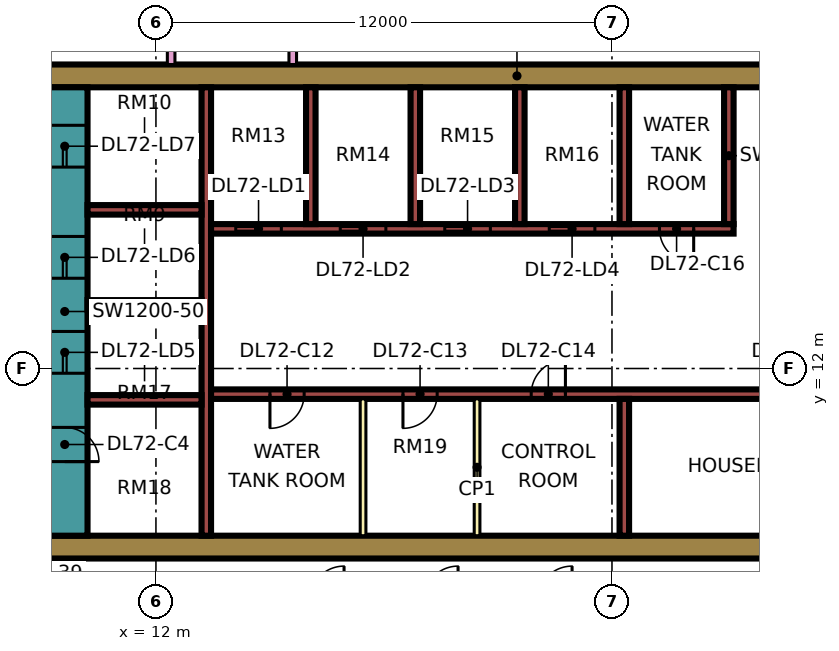
"""IFC4 building model, lengths in metres.
Left out: names, types, materials, properties, quantities, classifications, styles, units other than length and angle.
Written with IfcOpenShell. Run it as: python <this file> out.ifc"""

import sys

from ifc_helpers import new_model, si_unit, direction, frame, frame_2d, origin, place, context, subcontext, project, spatial, rectangle, extrude, element, fill, save


model = new_model("IFC4")
c1 = context("Model", 3, precision=1e-05, world=origin(), true_north=direction((0.0, 1.0)))
c2 = subcontext(c1, "Body", "Model", "MODEL_VIEW")
j1 = project(units=[si_unit("LENGTHUNIT", "METRE"), si_unit("PLANEANGLEUNIT", "RADIAN")], contexts=[c1])
p1 = place(None, origin())
s1 = spatial("IfcSite", under=j1, at=p1, CompositionType="ELEMENT")
p2 = place(p1, origin())
s2 = spatial("IfcBuilding", under=s1, at=p2, CompositionType="ELEMENT")
p3 = place(p2, frame((0.0, 0.0, 307.15)))
s3 = spatial("IfcBuildingStorey", under=s2, at=p3, CompositionType="ELEMENT", Elevation=307.15)
p4 = place(p3, frame((9.0, 7.3, 0.0), z_axis=(0.0, 0.0, 1.0), x_axis=(1.0, 0.0, 0.0)))
e1 = element("IfcWall", 1, at=p4, inside=s3, PredefinedType="SHEAR", context=c2, shape_type="SweptSolid", body=[
    extrude(rectangle(XDim=25.0, YDim=0.6, at=frame_2d((12.5, 0.0))), origin(), (0.0, 0.0, 1.0), 3.75),
])
p5 = place(p3, frame((9.0, 19.7, 0.0), z_axis=(0.0, 0.0, 1.0), x_axis=(1.0, 0.0, 0.0)))
e2 = element("IfcWall", 2, at=p5, inside=s3, PredefinedType="SHEAR", context=c2, shape_type="SweptSolid", body=[
    extrude(rectangle(XDim=25.0, YDim=0.6, at=frame_2d((12.5, 0.0))), origin(), (0.0, 0.0, 1.0), 3.75),
])
p6 = place(p5, frame((19.1, 0.0, 0.0)))
e3 = element("IfcOpeningElement", 3, at=p6, cuts=e2, PredefinedType="OPENING", context=c2, shape_type="SweptSolid", body=[
    extrude(rectangle(XDim=1.8, YDim=2.4, at=frame_2d((0.9, 1.2))), frame((0.0, 0.31, 0.0), z_axis=(0.0, -1.0, 0.0), x_axis=(1.0, 0.0, 0.0)), (0.0, 0.0, 1.0), 0.62),
])
p7 = place(p3, frame((9.6, 7.6, 0.0), z_axis=(0.0, 0.0, 1.0), x_axis=(0.0, 1.0, 0.0)))
e4 = element("IfcWall", 4, at=p7, inside=s3, PredefinedType="SHEAR", context=c2, shape_type="SweptSolid", body=[
    extrude(rectangle(XDim=11.8, YDim=1.2, at=frame_2d((5.9, 0.0))), origin(), (0.0, 0.0, 1.0), 3.75),
])
p8 = place(p7, frame((4.275, 0.0, 0.0)))
e5 = element("IfcOpeningElement", 5, at=p8, cuts=e4, PredefinedType="OPENING", context=c2, shape_type="SweptSolid", body=[
    extrude(rectangle(XDim=1.1, YDim=2.2, at=frame_2d((0.55, 1.1))), frame((0.0, 0.61, 0.0), z_axis=(0.0, -1.0, 0.0), x_axis=(1.0, 0.0, 0.0)), (0.0, 0.0, 1.0), 1.22),
])
p9 = place(p7, frame((6.775, 0.0, 0.0)))
e6 = element("IfcOpeningElement", 6, at=p9, cuts=e4, PredefinedType="OPENING", context=c2, shape_type="SweptSolid", body=[
    extrude(rectangle(XDim=1.1, YDim=2.2, at=frame_2d((0.55, 1.1))), frame((0.0, 0.61, 0.0), z_axis=(0.0, -1.0, 0.0), x_axis=(1.0, 0.0, 0.0)), (0.0, 0.0, 1.0), 1.22),
])
p10 = place(p7, frame((9.7, 0.0, 0.0)))
e7 = element("IfcOpeningElement", 7, at=p10, cuts=e4, PredefinedType="OPENING", context=c2, shape_type="SweptSolid", body=[
    extrude(rectangle(XDim=1.1, YDim=2.2, at=frame_2d((0.55, 1.1))), frame((0.0, 0.61, 0.0), z_axis=(0.0, -1.0, 0.0), x_axis=(1.0, 0.0, 0.0)), (0.0, 0.0, 1.0), 1.22),
])
p11 = place(p7, frame((1.95, 0.0, 0.0)))
e8 = element("IfcOpeningElement", 8, at=p11, cuts=e4, PredefinedType="OPENING", context=c2, shape_type="SweptSolid", body=[
    extrude(rectangle(XDim=0.9, YDim=2.1, at=frame_2d((0.45, 1.05))), frame((0.0, 0.61, 0.0), z_axis=(0.0, -1.0, 0.0), x_axis=(1.0, 0.0, 0.0)), (0.0, 0.0, 1.0), 1.22),
])
p12 = place(p3, frame((13.325, 7.6, 0.0), z_axis=(0.0, 0.0, 1.0), x_axis=(0.0, 1.0, 0.0)))
e9 = element("IfcWall", 9, at=p12, inside=s3, PredefinedType="SHEAR", context=c2, shape_type="SweptSolid", body=[
    extrude(rectangle(XDim=11.8, YDim=0.25, at=frame_2d((5.9, 0.0))), origin(), (0.0, 0.0, 1.0), 3.75),
])
p13 = place(p3, frame((13.45, 11.325, 0.0), z_axis=(0.0, 0.0, 1.0), x_axis=(1.0, 0.0, 0.0)))
e10 = element("IfcWall", 10, at=p13, inside=s3, PredefinedType="SHEAR", context=c2, shape_type="SweptSolid", body=[
    extrude(rectangle(XDim=19.95, YDim=0.25, at=frame_2d((9.975, 0.0))), origin(), (0.0, 0.0, 1.0), 3.75),
])
p14 = place(p13, frame((1.55, 0.0, 0.0)))
e11 = element("IfcOpeningElement", 11, at=p14, cuts=e10, PredefinedType="OPENING", context=c2, shape_type="SweptSolid", body=[
    extrude(rectangle(XDim=0.9, YDim=2.1, at=frame_2d((0.45, 1.05))), frame((0.0, 0.135, 0.0), z_axis=(0.0, -1.0, 0.0), x_axis=(1.0, 0.0, 0.0)), (0.0, 0.0, 1.0), 0.27),
])
p15 = place(p13, frame((5.05, 0.0, 0.0)))
e12 = element("IfcOpeningElement", 12, at=p15, cuts=e10, PredefinedType="OPENING", context=c2, shape_type="SweptSolid", body=[
    extrude(rectangle(XDim=0.9, YDim=2.1, at=frame_2d((0.45, 1.05))), frame((0.0, 0.135, 0.0), z_axis=(0.0, -1.0, 0.0), x_axis=(1.0, 0.0, 0.0)), (0.0, 0.0, 1.0), 0.27),
])
p16 = place(p13, frame((8.425, 0.0, 0.0)))
e13 = element("IfcOpeningElement", 13, at=p16, cuts=e10, PredefinedType="OPENING", context=c2, shape_type="SweptSolid", body=[
    extrude(rectangle(XDim=0.9, YDim=2.1, at=frame_2d((0.45, 1.05))), frame((0.0, 0.135, 0.0), z_axis=(0.0, -1.0, 0.0), x_axis=(1.0, 0.0, 0.0)), (0.0, 0.0, 1.0), 0.27),
])
p17 = place(p13, frame((15.025, 0.0, 0.0)))
e14 = element("IfcOpeningElement", 14, at=p17, cuts=e10, PredefinedType="OPENING", context=c2, shape_type="SweptSolid", body=[
    extrude(rectangle(XDim=0.9, YDim=2.1, at=frame_2d((0.45, 1.05))), frame((0.0, 0.135, 0.0), z_axis=(0.0, -1.0, 0.0), x_axis=(1.0, 0.0, 0.0)), (0.0, 0.0, 1.0), 0.27),
])
p18 = place(p3, frame((13.45, 15.675, 0.0), z_axis=(0.0, 0.0, 1.0), x_axis=(1.0, 0.0, 0.0)))
e15 = element("IfcWall", 15, at=p18, inside=s3, PredefinedType="SHEAR", context=c2, shape_type="SweptSolid", body=[
    extrude(rectangle(XDim=13.75, YDim=0.25, at=frame_2d((6.875, 0.0))), origin(), (0.0, 0.0, 1.0), 3.75),
])
p19 = place(p18, frame((0.65, 0.0, 0.0)))
e16 = element("IfcOpeningElement", 16, at=p19, cuts=e15, PredefinedType="OPENING", context=c2, shape_type="SweptSolid", body=[
    extrude(rectangle(XDim=1.2, YDim=2.2, at=frame_2d((0.6, 1.1))), frame((0.0, 0.135, 0.0), z_axis=(0.0, -1.0, 0.0), x_axis=(1.0, 0.0, 0.0)), (0.0, 0.0, 1.0), 0.27),
])
p20 = place(p18, frame((3.4, 0.0, 0.0)))
e17 = element("IfcOpeningElement", 17, at=p20, cuts=e15, PredefinedType="OPENING", context=c2, shape_type="SweptSolid", body=[
    extrude(rectangle(XDim=1.2, YDim=2.2, at=frame_2d((0.6, 1.1))), frame((0.0, 0.135, 0.0), z_axis=(0.0, -1.0, 0.0), x_axis=(1.0, 0.0, 0.0)), (0.0, 0.0, 1.0), 0.27),
])
p21 = place(p18, frame((6.15, 0.0, 0.0)))
e18 = element("IfcOpeningElement", 18, at=p21, cuts=e15, PredefinedType="OPENING", context=c2, shape_type="SweptSolid", body=[
    extrude(rectangle(XDim=1.2, YDim=2.2, at=frame_2d((0.6, 1.1))), frame((0.0, 0.135, 0.0), z_axis=(0.0, -1.0, 0.0), x_axis=(1.0, 0.0, 0.0)), (0.0, 0.0, 1.0), 0.27),
])
p22 = place(p18, frame((8.9, 0.0, 0.0)))
e19 = element("IfcOpeningElement", 19, at=p22, cuts=e15, PredefinedType="OPENING", context=c2, shape_type="SweptSolid", body=[
    extrude(rectangle(XDim=1.2, YDim=2.2, at=frame_2d((0.6, 1.1))), frame((0.0, 0.135, 0.0), z_axis=(0.0, -1.0, 0.0), x_axis=(1.0, 0.0, 0.0)), (0.0, 0.0, 1.0), 0.27),
])
p23 = place(p18, frame((11.8, 0.0, 0.0)))
e20 = element("IfcOpeningElement", 20, at=p23, cuts=e15, PredefinedType="OPENING", context=c2, shape_type="SweptSolid", body=[
    extrude(rectangle(XDim=0.9, YDim=2.1, at=frame_2d((0.45, 1.05))), frame((0.0, 0.135, 0.0), z_axis=(0.0, -1.0, 0.0), x_axis=(1.0, 0.0, 0.0)), (0.0, 0.0, 1.0), 0.27),
])
for number, where, z_axis, x_axis in (
    (21, (10.2, 11.175, 0.0), (0.0, 0.0, 1.0), (1.0, 0.0, 0.0)),
    (22, (10.2, 13.675, 0.0), (0.0, 0.0, 1.0), (1.0, 0.0, 0.0)),
    (23, (10.2, 16.175, 0.0), (0.0, 0.0, 1.0), (1.0, 0.0, 0.0)),
):
    element("IfcWall", number, at=place(p3, frame(where, z_axis=z_axis, x_axis=x_axis)), inside=s3, PredefinedType="SHEAR", context=c2, shape_type="SweptSolid", body=[
        extrude(rectangle(XDim=3.0, YDim=0.25, at=frame_2d((1.5, 0.0))), origin(), (0.0, 0.0, 1.0), 3.75),
    ])
for number, where, z_axis, x_axis in (
    (24, (24.325, 7.6, 0.0), (0.0, 0.0, 1.0), (0.0, 1.0, 0.0)),
    (25, (16.075, 15.8, 0.0), (0.0, 0.0, 1.0), (0.0, 1.0, 0.0)),
    (26, (18.825, 15.8, 0.0), (0.0, 0.0, 1.0), (0.0, 1.0, 0.0)),
    (27, (21.575, 15.8, 0.0), (0.0, 0.0, 1.0), (0.0, 1.0, 0.0)),
    (28, (24.325, 15.8, 0.0), (0.0, 0.0, 1.0), (0.0, 1.0, 0.0)),
    (29, (27.075, 15.8, 0.0), (0.0, 0.0, 1.0), (0.0, 1.0, 0.0)),
):
    element("IfcWall", number, at=place(p3, frame(where, z_axis=z_axis, x_axis=x_axis)), inside=s3, PredefinedType="SHEAR", context=c2, shape_type="SweptSolid", body=[
        extrude(rectangle(XDim=3.6, YDim=0.25, at=frame_2d((1.8, 0.0))), origin(), (0.0, 0.0, 1.0), 3.75),
    ])
p24 = place(p3, frame((-1.447, 12.553, 0.0), z_axis=(0.0, 0.0, 1.0), x_axis=(0.707106781187, -0.707106781187, 0.0)))
e30 = element("IfcWall", 30, at=p24, inside=s3, PredefinedType="SOLIDWALL", context=c2, shape_type="SweptSolid", body=[
    extrude(rectangle(XDim=19.799, YDim=0.15, at=frame_2d((9.899, 0.0))), origin(), (0.0, 0.0, 1.0), 3.35),
])
p25 = place(p24, frame((2.212, 0.0, 0.45)))
e31 = element("IfcOpeningElement", 31, at=p25, cuts=e30, PredefinedType="OPENING", context=c2, shape_type="SweptSolid", body=[
    extrude(rectangle(XDim=3.0, YDim=2.4, at=frame_2d((1.5, 1.2))), frame((0.0, 0.085, 0.0), z_axis=(0.0, -1.0, 0.0), x_axis=(1.0, 0.0, 0.0)), (0.0, 0.0, 1.0), 0.17),
])
p26 = place(p24, frame((10.216, 0.0, 0.45)))
e32 = element("IfcOpeningElement", 32, at=p26, cuts=e30, PredefinedType="OPENING", context=c2, shape_type="SweptSolid", body=[
    extrude(rectangle(XDim=3.0, YDim=2.4, at=frame_2d((1.5, 1.2))), frame((0.0, 0.085, 0.0), z_axis=(0.0, -1.0, 0.0), x_axis=(1.0, 0.0, 0.0)), (0.0, 0.0, 1.0), 0.17),
])
for number, where, z_axis, x_axis in (
    (33, (17.45, 7.6, 0.0), (0.0, 0.0, 1.0), (0.0, 1.0, 0.0)),
    (34, (20.45, 7.6, 0.0), (0.0, 0.0, 1.0), (0.0, 1.0, 0.0)),
):
    element("IfcWall", number, at=place(p3, frame(where, z_axis=z_axis, x_axis=x_axis)), inside=s3, PredefinedType="PARTITIONING", context=c2, shape_type="SweptSolid", body=[
        extrude(rectangle(XDim=3.6, YDim=0.15, at=frame_2d((1.8, 0.0))), origin(), (0.0, 0.0, 1.0), 3.35),
    ])
p27 = place(p3, frame((12.4, 20.0, 0.0), z_axis=(0.0, 0.0, 1.0), x_axis=(0.0, 1.0, 0.0)))
e35 = element("IfcWall", 35, at=p27, inside=s3, PredefinedType="PARTITIONING", context=c2, shape_type="SweptSolid", body=[
    extrude(rectangle(XDim=34.0, YDim=0.2, at=frame_2d((17.0, 0.0))), origin(), (0.0, 0.0, 1.0), 3.35),
])
p28 = place(p27, frame((19.8, 0.0, 0.0)))
e36 = element("IfcOpeningElement", 36, at=p28, cuts=e35, PredefinedType="OPENING", context=c2, shape_type="SweptSolid", body=[
    extrude(rectangle(XDim=1.0, YDim=2.1, at=frame_2d((0.5, 1.05))), frame((0.0, 0.11, 0.0), z_axis=(0.0, -1.0, 0.0), x_axis=(1.0, 0.0, 0.0)), (0.0, 0.0, 1.0), 0.22),
])
p29 = place(p27, frame((0.6, 0.0, 0.0)))
e37 = element("IfcOpeningElement", 37, at=p29, cuts=e35, PredefinedType="OPENING", context=c2, shape_type="SweptSolid", body=[
    extrude(rectangle(XDim=1.2, YDim=2.1, at=frame_2d((0.6, 1.05))), frame((0.0, 0.11, 0.0), z_axis=(0.0, -1.0, 0.0), x_axis=(1.0, 0.0, 0.0)), (0.0, 0.0, 1.0), 0.22),
])
p30 = place(p27, frame((4.5, 0.0, 0.0)))
e38 = element("IfcOpeningElement", 38, at=p30, cuts=e35, PredefinedType="OPENING", context=c2, shape_type="SweptSolid", body=[
    extrude(rectangle(XDim=1.0, YDim=2.1, at=frame_2d((0.5, 1.05))), frame((0.0, 0.11, 0.0), z_axis=(0.0, -1.0, 0.0), x_axis=(1.0, 0.0, 0.0)), (0.0, 0.0, 1.0), 0.22),
])
p31 = place(p3, frame((15.6, 20.0, 0.0), z_axis=(0.0, 0.0, 1.0), x_axis=(0.0, 1.0, 0.0)))
e39 = element("IfcWall", 39, at=p31, inside=s3, PredefinedType="PARTITIONING", context=c2, shape_type="SweptSolid", body=[
    extrude(rectangle(XDim=27.775, YDim=0.2, at=frame_2d((13.887, 0.0))), origin(), (0.0, 0.0, 1.0), 3.35),
])
p32 = place(p31, frame((7.0, 0.0, 0.0)))
e40 = element("IfcOpeningElement", 40, at=p32, cuts=e39, PredefinedType="OPENING", context=c2, shape_type="SweptSolid", body=[
    extrude(rectangle(XDim=1.0, YDim=2.1, at=frame_2d((0.5, 1.05))), frame((0.0, 0.11, 0.0), z_axis=(0.0, -1.0, 0.0), x_axis=(1.0, 0.0, 0.0)), (0.0, 0.0, 1.0), 0.22),
])
p33 = place(p31, frame((12.95, 0.0, 0.0)))
e41 = element("IfcOpeningElement", 41, at=p33, cuts=e39, PredefinedType="OPENING", context=c2, shape_type="SweptSolid", body=[
    extrude(rectangle(XDim=1.0, YDim=2.1, at=frame_2d((0.5, 1.05))), frame((0.0, 0.11, 0.0), z_axis=(0.0, -1.0, 0.0), x_axis=(1.0, 0.0, 0.0)), (0.0, 0.0, 1.0), 0.22),
])
p34 = place(p31, frame((16.75, 0.0, 0.0)))
e42 = element("IfcOpeningElement", 42, at=p34, cuts=e39, PredefinedType="OPENING", context=c2, shape_type="SweptSolid", body=[
    extrude(rectangle(XDim=1.0, YDim=2.1, at=frame_2d((0.5, 1.05))), frame((0.0, 0.11, 0.0), z_axis=(0.0, -1.0, 0.0), x_axis=(1.0, 0.0, 0.0)), (0.0, 0.0, 1.0), 0.22),
])
p35 = place(p31, frame((1.15, 0.0, 0.0)))
e43 = element("IfcOpeningElement", 43, at=p35, cuts=e39, PredefinedType="OPENING", context=c2, shape_type="SweptSolid", body=[
    extrude(rectangle(XDim=1.8, YDim=2.1, at=frame_2d((0.9, 1.05))), frame((0.0, 0.11, 0.0), z_axis=(0.0, -1.0, 0.0), x_axis=(1.0, 0.0, 0.0)), (0.0, 0.0, 1.0), 0.22),
])
p36 = place(p31, frame((25.9, 0.0, 0.0)))
e44 = element("IfcOpeningElement", 44, at=p36, cuts=e39, PredefinedType="OPENING", context=c2, shape_type="SweptSolid", body=[
    extrude(rectangle(XDim=1.0, YDim=2.1, at=frame_2d((0.5, 1.05))), frame((0.0, 0.11, 0.0), z_axis=(0.0, -1.0, 0.0), x_axis=(1.0, 0.0, 0.0)), (0.0, 0.0, 1.0), 0.22),
])
p37 = place(p19, origin())
e45 = element("IfcDoor", 45, at=p37, inside=s3, OperationType="DOUBLE_DOOR_SLIDING", PredefinedType="DOOR", context=c2, shape_type="SweptSolid", body=[
    extrude(rectangle(XDim=1.2, YDim=2.2, at=frame_2d((0.6, 1.1))), frame((0.0, 0.025, 0.0), z_axis=(0.0, -1.0, 0.0), x_axis=(1.0, 0.0, 0.0)), (0.0, 0.0, 1.0), 0.05),
])
fill(e16, e45)
p38 = place(p20, origin())
e46 = element("IfcDoor", 46, at=p38, inside=s3, OperationType="DOUBLE_DOOR_SLIDING", PredefinedType="DOOR", context=c2, shape_type="SweptSolid", body=[
    extrude(rectangle(XDim=1.2, YDim=2.2, at=frame_2d((0.6, 1.1))), frame((0.0, 0.025, 0.0), z_axis=(0.0, -1.0, 0.0), x_axis=(1.0, 0.0, 0.0)), (0.0, 0.0, 1.0), 0.05),
])
fill(e17, e46)
p39 = place(p21, origin())
e47 = element("IfcDoor", 47, at=p39, inside=s3, OperationType="DOUBLE_DOOR_SLIDING", PredefinedType="DOOR", context=c2, shape_type="SweptSolid", body=[
    extrude(rectangle(XDim=1.2, YDim=2.2, at=frame_2d((0.6, 1.1))), frame((0.0, 0.025, 0.0), z_axis=(0.0, -1.0, 0.0), x_axis=(1.0, 0.0, 0.0)), (0.0, 0.0, 1.0), 0.05),
])
fill(e18, e47)
p40 = place(p22, origin())
e48 = element("IfcDoor", 48, at=p40, inside=s3, OperationType="DOUBLE_DOOR_SLIDING", PredefinedType="DOOR", context=c2, shape_type="SweptSolid", body=[
    extrude(rectangle(XDim=1.2, YDim=2.2, at=frame_2d((0.6, 1.1))), frame((0.0, 0.025, 0.0), z_axis=(0.0, -1.0, 0.0), x_axis=(1.0, 0.0, 0.0)), (0.0, 0.0, 1.0), 0.05),
])
fill(e19, e48)
p41 = place(p8, origin())
e49 = element("IfcDoor", 49, at=p41, inside=s3, OperationType="DOUBLE_DOOR_SLIDING", PredefinedType="DOOR", context=c2, shape_type="SweptSolid", body=[
    extrude(rectangle(XDim=1.1, YDim=2.2, at=frame_2d((0.55, 1.1))), frame((0.0, 0.025, 0.0), z_axis=(0.0, -1.0, 0.0), x_axis=(1.0, 0.0, 0.0)), (0.0, 0.0, 1.0), 0.05),
])
fill(e5, e49)
p42 = place(p9, origin())
e50 = element("IfcDoor", 50, at=p42, inside=s3, OperationType="DOUBLE_DOOR_SLIDING", PredefinedType="DOOR", context=c2, shape_type="SweptSolid", body=[
    extrude(rectangle(XDim=1.1, YDim=2.2, at=frame_2d((0.55, 1.1))), frame((0.0, 0.025, 0.0), z_axis=(0.0, -1.0, 0.0), x_axis=(1.0, 0.0, 0.0)), (0.0, 0.0, 1.0), 0.05),
])
fill(e6, e50)
p43 = place(p10, origin())
e51 = element("IfcDoor", 51, at=p43, inside=s3, OperationType="DOUBLE_DOOR_SLIDING", PredefinedType="DOOR", context=c2, shape_type="SweptSolid", body=[
    extrude(rectangle(XDim=1.1, YDim=2.2, at=frame_2d((0.55, 1.1))), frame((0.0, 0.025, 0.0), z_axis=(0.0, -1.0, 0.0), x_axis=(1.0, 0.0, 0.0)), (0.0, 0.0, 1.0), 0.05),
])
fill(e7, e51)
p44 = place(p11, frame((0.9, 0.0, 0.0), z_axis=(0.0, 0.0, 1.0), x_axis=(-1.0, 0.0, 0.0)))
e52 = element("IfcDoor", 52, at=p44, inside=s3, OperationType="SINGLE_SWING_LEFT", PredefinedType="DOOR", context=c2, shape_type="SweptSolid", body=[
    extrude(rectangle(XDim=0.9, YDim=2.1, at=frame_2d((0.45, 1.05))), frame((0.0, 0.025, 0.0), z_axis=(0.0, -1.0, 0.0), x_axis=(1.0, 0.0, 0.0)), (0.0, 0.0, 1.0), 0.05),
])
fill(e8, e52)
p45 = place(p14, frame((0.9, 0.0, 0.0), z_axis=(0.0, 0.0, 1.0), x_axis=(-1.0, 0.0, 0.0)))
e53 = element("IfcDoor", 53, at=p45, inside=s3, OperationType="SINGLE_SWING_LEFT", PredefinedType="DOOR", context=c2, shape_type="SweptSolid", body=[
    extrude(rectangle(XDim=0.9, YDim=2.1, at=frame_2d((0.45, 1.05))), frame((0.0, 0.025, 0.0), z_axis=(0.0, -1.0, 0.0), x_axis=(1.0, 0.0, 0.0)), (0.0, 0.0, 1.0), 0.05),
])
fill(e11, e53)
p46 = place(p15, frame((0.9, 0.0, 0.0), z_axis=(0.0, 0.0, 1.0), x_axis=(-1.0, 0.0, 0.0)))
e54 = element("IfcDoor", 54, at=p46, inside=s3, OperationType="SINGLE_SWING_LEFT", PredefinedType="DOOR", context=c2, shape_type="SweptSolid", body=[
    extrude(rectangle(XDim=0.9, YDim=2.1, at=frame_2d((0.45, 1.05))), frame((0.0, 0.025, 0.0), z_axis=(0.0, -1.0, 0.0), x_axis=(1.0, 0.0, 0.0)), (0.0, 0.0, 1.0), 0.05),
])
fill(e12, e54)
p47 = place(p16, frame((0.9, 0.0, 0.0), z_axis=(0.0, 0.0, 1.0), x_axis=(-1.0, 0.0, 0.0)))
e55 = element("IfcDoor", 55, at=p47, inside=s3, OperationType="SINGLE_SWING_RIGHT", PredefinedType="DOOR", context=c2, shape_type="SweptSolid", body=[
    extrude(rectangle(XDim=0.9, YDim=2.1, at=frame_2d((0.45, 1.05))), frame((0.0, 0.025, 0.0), z_axis=(0.0, -1.0, 0.0), x_axis=(1.0, 0.0, 0.0)), (0.0, 0.0, 1.0), 0.05),
])
fill(e13, e55)
p48 = place(p23, origin())
e56 = element("IfcDoor", 56, at=p48, inside=s3, OperationType="SINGLE_SWING_RIGHT", PredefinedType="DOOR", context=c2, shape_type="SweptSolid", body=[
    extrude(rectangle(XDim=0.9, YDim=2.1, at=frame_2d((0.45, 1.05))), frame((0.0, 0.025, 0.0), z_axis=(0.0, -1.0, 0.0), x_axis=(1.0, 0.0, 0.0)), (0.0, 0.0, 1.0), 0.05),
])
fill(e20, e56)
save(model, sys.argv[1])
